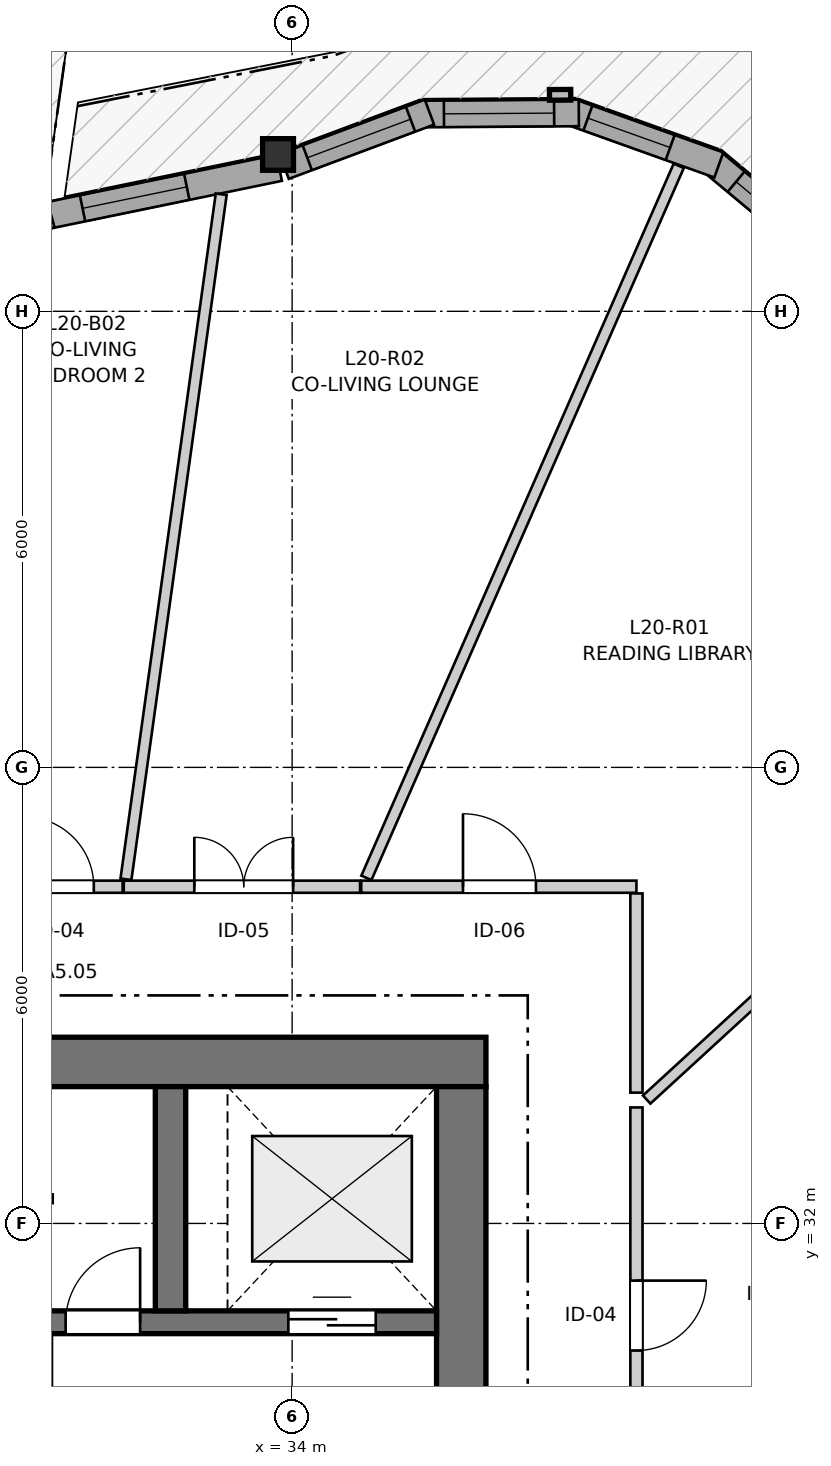
"""IFC4 building model, lengths in metres.
Left out: names, types, materials, properties, quantities, classifications, styles, units other than length and angle.
Written with IfcOpenShell. Run it as: python <this file> out.ifc"""

import sys

from ifc_helpers import new_model, si_unit, direction, frame, frame_2d, origin, origin_2d, place, context, subcontext, project, spatial, rectangle, i_section, extrude, source, transform, mapped, element, fill, save


model = new_model("IFC4")
c1 = context("Model", 3, precision=1e-05, world=origin(), true_north=direction((0.0, 1.0)))
c2 = subcontext(c1, "Body", "Model", "MODEL_VIEW")
j1 = project(units=[si_unit("LENGTHUNIT", "METRE"), si_unit("PLANEANGLEUNIT", "RADIAN")], contexts=[c1])
p1 = place(None, origin())
s1 = spatial("IfcSite", under=j1, at=p1, CompositionType="ELEMENT")
p2 = place(p1, origin())
s2 = spatial("IfcBuilding", under=s1, at=p2, CompositionType="ELEMENT")
p3 = place(p2, frame((0.0, 0.0, 70.4)))
s3 = spatial("IfcBuildingStorey", under=s2, at=p3, CompositionType="ELEMENT", Elevation=70.4)
p4 = place(p3, frame((36.55, 34.125, 0.0), z_axis=(0.0, 0.0, 1.0), x_axis=(-1.0, 0.0, 0.0)))
e1 = element("IfcWall", 1, at=p4, inside=s3, PredefinedType="SHEAR", context=c2, shape_type="SweptSolid", body=[
    extrude(rectangle(XDim=12.4, YDim=0.65, at=frame_2d((6.2, 0.0))), origin(), (0.0, 0.0, 1.0), 2.95),
])
p5 = place(p3, frame((36.225, 18.2, 0.0), z_axis=(0.0, 0.0, 1.0), x_axis=(0.0, 1.0, 0.0)))
e2 = element("IfcWall", 2, at=p5, inside=s3, PredefinedType="SHEAR", context=c2, shape_type="SweptSolid", body=[
    extrude(rectangle(XDim=15.6, YDim=0.65, at=frame_2d((7.8, 0.0))), origin(), (0.0, 0.0, 1.0), 2.95),
])
p6 = place(p5, frame((4.25, 0.0, 0.0)))
e3 = element("IfcOpeningElement", 3, at=p6, cuts=e2, PredefinedType="OPENING", context=c2, shape_type="SweptSolid", body=[
    extrude(rectangle(XDim=1.1, YDim=2.15, at=frame_2d((0.55, 1.075))), frame((0.0, 0.335, 0.0), z_axis=(0.0, -1.0, 0.0), x_axis=(1.0, 0.0, 0.0)), (0.0, 0.0, 1.0), 0.67),
])
p7 = place(p5, frame((10.25, 0.0, 0.0)))
e4 = element("IfcOpeningElement", 4, at=p7, cuts=e2, PredefinedType="OPENING", context=c2, shape_type="SweptSolid", body=[
    extrude(rectangle(XDim=1.1, YDim=2.15, at=frame_2d((0.55, 1.075))), frame((0.0, 0.335, 0.0), z_axis=(0.0, -1.0, 0.0), x_axis=(1.0, 0.0, 0.0)), (0.0, 0.0, 1.0), 0.67),
])
p8 = place(p3, frame((24.8, 30.7, 0.0), z_axis=(0.0, 0.0, 1.0), x_axis=(1.0, 0.0, 0.0)))
e5 = element("IfcWall", 5, at=p8, inside=s3, PredefinedType="SHEAR", context=c2, shape_type="SweptSolid", body=[
    extrude(rectangle(XDim=11.1, YDim=0.3, at=frame_2d((5.55, 0.0))), origin(), (0.0, 0.0, 1.0), 2.95),
])
p9 = place(p8, frame((6.22, 0.0, 0.0)))
e6 = element("IfcOpeningElement", 6, at=p9, cuts=e5, PredefinedType="OPENING", context=c2, shape_type="SweptSolid", body=[
    extrude(rectangle(XDim=0.98, YDim=2.15, at=frame_2d((0.49, 1.075))), frame((0.0, 0.16, 0.0), z_axis=(0.0, -1.0, 0.0), x_axis=(1.0, 0.0, 0.0)), (0.0, 0.0, 1.0), 0.32),
])
p10 = place(p8, frame((9.15, 0.0, 0.0)))
e7 = element("IfcOpeningElement", 7, at=p10, cuts=e5, PredefinedType="OPENING", context=c2, shape_type="SweptSolid", body=[
    extrude(rectangle(XDim=1.15, YDim=2.15, at=frame_2d((0.575, 1.075))), frame((0.0, 0.16, 0.0), z_axis=(0.0, -1.0, 0.0), x_axis=(1.0, 0.0, 0.0)), (0.0, 0.0, 1.0), 0.32),
])
p11 = place(p3, frame((32.4, 30.85, 0.0), z_axis=(0.0, 0.0, 1.0), x_axis=(0.0, 1.0, 0.0)))
e8 = element("IfcWall", 8, at=p11, inside=s3, PredefinedType="SHEAR", context=c2, shape_type="SweptSolid", body=[
    extrude(rectangle(XDim=2.95, YDim=0.4, at=frame_2d((1.475, 0.0))), origin(), (0.0, 0.0, 1.0), 2.95),
])
m1 = source(origin(), c2, "Body", "SweptSolid", [
    extrude(i_section(OverallWidth=0.406, OverallDepth=0.416, WebThickness=0.027, FlangeThickness=0.044, FilletRadius=0.015, at=origin_2d()), origin(), (0.0, 0.0, 1.0), 2.95),
])
p12 = place(p3, frame((33.815, 46.063, 0.0), z_axis=(0.0, 0.0, 1.0), x_axis=(1.0, 0.0, 0.0)))
e9 = element("IfcColumn", 9, at=p12, inside=s3, PredefinedType="PILASTER", context=c2, shape_type="MappedRepresentation", body=[
    mapped(m1, transform((0.0, 0.0, 0.0), x_axis=(1.0, 0.0, 0.0), y_axis=(0.0, 1.0, 0.0), z_axis=(0.0, 0.0, 1.0), scale=1.0)),
])
p13 = place(p3, frame((41.109, 44.65, 0.0), z_axis=(0.0, 0.0, 1.0), x_axis=(-0.768450068703, 0.639909752942, 0.0)))
e10 = element("IfcWall", 10, at=p13, inside=s3, PredefinedType="SOLIDWALL", context=c2, shape_type="SweptSolid", body=[
    extrude(rectangle(XDim=2.099, YDim=0.35, at=frame_2d((1.049, 0.0))), origin(), (0.0, 0.0, 1.0), 2.48),
])
p14 = place(p13, frame((0.449, 0.0, 0.82)))
e11 = element("IfcOpeningElement", 11, at=p14, cuts=e10, PredefinedType="OPENING", context=c2, shape_type="SweptSolid", body=[
    extrude(rectangle(XDim=1.2, YDim=1.45, at=frame_2d((0.6, 0.725))), frame((0.0, 0.185, 0.0), z_axis=(0.0, -1.0, 0.0), x_axis=(1.0, 0.0, 0.0)), (0.0, 0.0, 1.0), 0.37),
])
p15 = place(p3, frame((39.614, 45.925, 0.0), z_axis=(0.0, 0.0, 1.0), x_axis=(-0.941486401639, 0.33705096874, 0.0)))
e12 = element("IfcWall", 12, at=p15, inside=s3, PredefinedType="SOLIDWALL", context=c2, shape_type="SweptSolid", body=[
    extrude(rectangle(XDim=2.099, YDim=0.35, at=frame_2d((1.05, 0.0))), origin(), (0.0, 0.0, 1.0), 2.48),
])
p16 = place(p15, frame((0.68, 0.0, 0.82)))
e13 = element("IfcOpeningElement", 13, at=p16, cuts=e12, PredefinedType="OPENING", context=c2, shape_type="SweptSolid", body=[
    extrude(rectangle(XDim=1.15, YDim=1.2, at=frame_2d((0.575, 0.6))), frame((0.0, 0.185, 0.0), z_axis=(0.0, -1.0, 0.0), x_axis=(1.0, 0.0, 0.0)), (0.0, 0.0, 1.0), 0.37),
])
p17 = place(p3, frame((37.772, 46.61, 0.0), z_axis=(0.0, 0.0, 1.0), x_axis=(-0.999976451414, -0.006862697526, 0.0)))
e14 = element("IfcWall", 14, at=p17, inside=s3, PredefinedType="SOLIDWALL", context=c2, shape_type="SweptSolid", body=[
    extrude(rectangle(XDim=2.099, YDim=0.35, at=frame_2d((1.049, 0.0))), origin(), (0.0, 0.0, 1.0), 2.48),
])
p18 = place(p17, frame((0.324, 0.0, 0.82)))
e15 = element("IfcOpeningElement", 15, at=p18, cuts=e14, PredefinedType="OPENING", context=c2, shape_type="SweptSolid", body=[
    extrude(rectangle(XDim=1.45, YDim=1.25, at=frame_2d((0.725, 0.625))), frame((0.0, 0.185, 0.0), z_axis=(0.0, -1.0, 0.0), x_axis=(1.0, 0.0, 0.0)), (0.0, 0.0, 1.0), 0.37),
])
p19 = place(p3, frame((35.806, 46.62, 0.0), z_axis=(0.0, 0.0, 1.0), x_axis=(-0.936863987578, -0.34969396446, 0.0)))
e16 = element("IfcWall", 16, at=p19, inside=s3, PredefinedType="SOLIDWALL", context=c2, shape_type="SweptSolid", body=[
    extrude(rectangle(XDim=2.041, YDim=0.35, at=frame_2d((1.021, 0.0))), origin(), (0.0, 0.0, 1.0), 2.48),
])
p20 = place(p19, frame((0.265, 0.0, 0.82)))
e17 = element("IfcOpeningElement", 17, at=p20, cuts=e16, PredefinedType="OPENING", context=c2, shape_type="SweptSolid", body=[
    extrude(rectangle(XDim=1.45, YDim=1.25, at=frame_2d((0.725, 0.625))), frame((0.0, 0.185, 0.0), z_axis=(0.0, -1.0, 0.0), x_axis=(1.0, 0.0, 0.0)), (0.0, 0.0, 1.0), 0.37),
])
p21 = place(p3, frame((33.83, 45.888, 0.0), z_axis=(0.0, 0.0, 1.0), x_axis=(-0.979439051097, -0.201740291429, 0.0)))
e18 = element("IfcWall", 18, at=p21, inside=s3, PredefinedType="SOLIDWALL", context=c2, shape_type="SweptSolid", body=[
    extrude(rectangle(XDim=3.154, YDim=0.35, at=frame_2d((1.577, 0.0))), origin(), (0.0, 0.0, 1.0), 2.48),
])
p22 = place(p21, frame((1.242, 0.0, 0.82)))
e19 = element("IfcOpeningElement", 19, at=p22, cuts=e18, PredefinedType="OPENING", context=c2, shape_type="SweptSolid", body=[
    extrude(rectangle(XDim=1.4, YDim=1.35, at=frame_2d((0.7, 0.675))), frame((0.0, 0.185, 0.0), z_axis=(0.0, -1.0, 0.0), x_axis=(1.0, 0.0, 0.0)), (0.0, 0.0, 1.0), 0.37),
])
p23 = place(p3, frame((30.827, 45.272, 0.0), z_axis=(0.0, 0.0, 1.0), x_axis=(-0.963061576901, -0.269281263918, 0.0)))
e20 = element("IfcWall", 20, at=p23, inside=s3, PredefinedType="SOLIDWALL", context=c2, shape_type="SweptSolid", body=[
    extrude(rectangle(XDim=2.883, YDim=0.35, at=frame_2d((1.441, 0.0))), origin(), (0.0, 0.0, 1.0), 2.48),
])
p24 = place(p23, frame((1.163, 0.0, 0.82)))
e21 = element("IfcOpeningElement", 21, at=p24, cuts=e20, PredefinedType="OPENING", context=c2, shape_type="SweptSolid", body=[
    extrude(rectangle(XDim=1.25, YDim=1.35, at=frame_2d((0.625, 0.675))), frame((0.0, 0.185, 0.0), z_axis=(0.0, -1.0, 0.0), x_axis=(1.0, 0.0, 0.0)), (0.0, 0.0, 1.0), 0.37),
])
p25 = place(p3, frame((38.53, 33.526, 0.0), z_axis=(0.0, 0.0, 1.0), x_axis=(0.0, -1.0, 0.0)))
e22 = element("IfcWall", 22, at=p25, inside=s3, PredefinedType="PARTITIONING", context=c2, shape_type="SweptSolid", body=[
    extrude(rectangle(XDim=5.472, YDim=0.16, at=frame_2d((2.736, 0.0))), origin(), (0.0, 0.0, 1.0), 2.95),
])
p26 = place(p25, frame((2.278, 0.0, 0.0)))
e23 = element("IfcOpeningElement", 23, at=p26, cuts=e22, PredefinedType="OPENING", context=c2, shape_type="SweptSolid", body=[
    extrude(rectangle(XDim=0.92, YDim=2.1, at=frame_2d((0.46, 1.05))), frame((0.0, 0.09, 0.0), z_axis=(0.0, -1.0, 0.0), x_axis=(1.0, 0.0, 0.0)), (0.0, 0.0, 1.0), 0.18),
])
p27 = place(p3, frame((34.909, 36.43, 0.0), z_axis=(0.0, 0.0, 1.0), x_axis=(1.0, 0.0, 0.0)))
e24 = element("IfcWall", 24, at=p27, inside=s3, PredefinedType="PARTITIONING", context=c2, shape_type="SweptSolid", body=[
    extrude(rectangle(XDim=3.621, YDim=0.16, at=frame_2d((1.811, 0.0))), origin(), (0.0, 0.0, 1.0), 2.588),
])
p28 = place(p27, frame((1.339, 0.0, 0.0)))
e25 = element("IfcOpeningElement", 25, at=p28, cuts=e24, PredefinedType="OPENING", context=c2, shape_type="SweptSolid", body=[
    extrude(rectangle(XDim=0.96, YDim=2.1, at=frame_2d((0.48, 1.05))), frame((0.0, 0.09, 0.0), z_axis=(0.0, -1.0, 0.0), x_axis=(1.0, 0.0, 0.0)), (0.0, 0.0, 1.0), 0.18),
])
p29 = place(p3, frame((31.785, 36.43, 0.0), z_axis=(0.0, 0.0, 1.0), x_axis=(1.0, 0.0, 0.0)))
e26 = element("IfcWall", 26, at=p29, inside=s3, PredefinedType="PARTITIONING", context=c2, shape_type="SweptSolid", body=[
    extrude(rectangle(XDim=3.109, YDim=0.16, at=frame_2d((1.555, 0.0))), origin(), (0.0, 0.0, 1.0), 2.95),
])
p30 = place(p29, frame((0.928, 0.0, 0.0)))
e27 = element("IfcOpeningElement", 27, at=p30, cuts=e26, PredefinedType="OPENING", context=c2, shape_type="SweptSolid", body=[
    extrude(rectangle(XDim=1.3, YDim=2.1, at=frame_2d((0.65, 1.05))), frame((0.0, 0.09, 0.0), z_axis=(0.0, -1.0, 0.0), x_axis=(1.0, 0.0, 0.0)), (0.0, 0.0, 1.0), 0.18),
])
p31 = place(p3, frame((30.091, 36.43, 0.0), z_axis=(0.0, 0.0, 1.0), x_axis=(1.0, 0.0, 0.0)))
e28 = element("IfcWall", 28, at=p31, inside=s3, PredefinedType="PARTITIONING", context=c2, shape_type="SweptSolid", body=[
    extrude(rectangle(XDim=1.679, YDim=0.16, at=frame_2d((0.839, 0.0))), origin(), (0.0, 0.0, 1.0), 2.95),
])
p32 = place(p31, frame((0.379, 0.0, 0.0)))
e29 = element("IfcOpeningElement", 29, at=p32, cuts=e28, PredefinedType="OPENING", context=c2, shape_type="SweptSolid", body=[
    extrude(rectangle(XDim=0.92, YDim=2.1, at=frame_2d((0.46, 1.05))), frame((0.0, 0.09, 0.0), z_axis=(0.0, -1.0, 0.0), x_axis=(1.0, 0.0, 0.0)), (0.0, 0.0, 1.0), 0.18),
])
p33 = place(p3, frame((34.977, 36.546, 0.0), z_axis=(0.0, 0.0, 1.0), x_axis=(0.40175384449, 0.915747699117, 0.0)))
e30 = element("IfcWall", 30, at=p33, inside=s3, PredefinedType="PARTITIONING", context=c2, shape_type="SweptSolid", body=[
    extrude(rectangle(XDim=10.23, YDim=0.145, at=frame_2d((5.115, 0.0))), origin(), (0.0, 0.0, 1.0), 2.95),
])
p34 = place(p3, frame((31.814, 36.528, 0.0), z_axis=(0.0, 0.0, 1.0), x_axis=(0.137724115974, 0.990470629488, 0.0)))
e31 = element("IfcWall", 31, at=p34, inside=s3, PredefinedType="PARTITIONING", context=c2, shape_type="SweptSolid", body=[
    extrude(rectangle(XDim=9.099, YDim=0.145, at=frame_2d((4.55, 0.0))), origin(), (0.0, 0.0, 1.0), 2.95),
])
p35 = place(p3, frame((38.665, 33.63, 0.0), z_axis=(0.0, 0.0, 1.0), x_axis=(0.736824900837, 0.676083623161, 0.0)))
e32 = element("IfcWall", 32, at=p35, inside=s3, PredefinedType="PARTITIONING", context=c2, shape_type="SweptSolid", body=[
    extrude(rectangle(XDim=6.25, YDim=0.145, at=frame_2d((3.125, 0.0))), origin(), (0.0, 0.0, 1.0), 2.95),
])
p36 = place(p3, frame((38.53, 33.721, 0.0), z_axis=(0.0, 0.0, 1.0), x_axis=(0.0, 1.0, 0.0)))
e33 = element("IfcWall", 33, at=p36, inside=s3, PredefinedType="PARTITIONING", context=c2, shape_type="SweptSolid", body=[
    extrude(rectangle(XDim=2.621, YDim=0.16, at=frame_2d((1.311, 0.0))), origin(), (0.0, 0.0, 1.0), 2.588),
])
m2 = source(origin(), c2, "Body", "SweptSolid", [
    extrude(rectangle(XDim=1.2, YDim=1.45, at=frame_2d((0.6, 0.725))), frame((0.0, 0.03, 0.0), z_axis=(0.0, -1.0, 0.0), x_axis=(1.0, 0.0, 0.0)), (0.0, 0.0, 1.0), 0.06),
])
p37 = place(p14, origin())
e34 = element("IfcWindow", 34, at=p37, inside=s3, PartitioningType="SINGLE_PANEL", PredefinedType="WINDOW", context=c2, shape_type="MappedRepresentation", body=[
    mapped(m2, transform((0.0, 0.0, 0.0), x_axis=(1.0, 0.0, 0.0), y_axis=(0.0, 1.0, 0.0), z_axis=(0.0, 0.0, 1.0), scale=1.0)),
])
fill(e11, e34)
m3 = source(origin(), c2, "Body", "SweptSolid", [
    extrude(rectangle(XDim=1.15, YDim=1.2, at=frame_2d((0.575, 0.6))), frame((0.0, 0.03, 0.0), z_axis=(0.0, -1.0, 0.0), x_axis=(1.0, 0.0, 0.0)), (0.0, 0.0, 1.0), 0.06),
])
p38 = place(p16, origin())
e35 = element("IfcWindow", 35, at=p38, inside=s3, PartitioningType="SINGLE_PANEL", PredefinedType="WINDOW", context=c2, shape_type="MappedRepresentation", body=[
    mapped(m3, transform((0.0, 0.0, 0.0), x_axis=(1.0, 0.0, 0.0), y_axis=(0.0, 1.0, 0.0), z_axis=(0.0, 0.0, 1.0), scale=1.0)),
])
fill(e13, e35)
m4 = source(origin(), c2, "Body", "SweptSolid", [
    extrude(rectangle(XDim=1.45, YDim=1.25, at=frame_2d((0.725, 0.625))), frame((0.0, 0.03, 0.0), z_axis=(0.0, -1.0, 0.0), x_axis=(1.0, 0.0, 0.0)), (0.0, 0.0, 1.0), 0.06),
])
p39 = place(p18, origin())
e36 = element("IfcWindow", 36, at=p39, inside=s3, PartitioningType="SINGLE_PANEL", PredefinedType="WINDOW", context=c2, shape_type="MappedRepresentation", body=[
    mapped(m4, transform((0.0, 0.0, 0.0), x_axis=(1.0, 0.0, 0.0), y_axis=(0.0, 1.0, 0.0), z_axis=(0.0, 0.0, 1.0), scale=1.0)),
])
fill(e15, e36)
p40 = place(p20, origin())
e37 = element("IfcWindow", 37, at=p40, inside=s3, PartitioningType="SINGLE_PANEL", PredefinedType="WINDOW", context=c2, shape_type="MappedRepresentation", body=[
    mapped(m4, transform((0.0, 0.0, 0.0), x_axis=(1.0, 0.0, 0.0), y_axis=(0.0, 1.0, 0.0), z_axis=(0.0, 0.0, 1.0), scale=1.0)),
])
fill(e17, e37)
m5 = source(origin(), c2, "Body", "SweptSolid", [
    extrude(rectangle(XDim=1.4, YDim=1.35, at=frame_2d((0.7, 0.675))), frame((0.0, 0.03, 0.0), z_axis=(0.0, -1.0, 0.0), x_axis=(1.0, 0.0, 0.0)), (0.0, 0.0, 1.0), 0.06),
])
p41 = place(p22, origin())
e38 = element("IfcWindow", 38, at=p41, inside=s3, PartitioningType="SINGLE_PANEL", PredefinedType="WINDOW", context=c2, shape_type="MappedRepresentation", body=[
    mapped(m5, transform((0.0, 0.0, 0.0), x_axis=(1.0, 0.0, 0.0), y_axis=(0.0, 1.0, 0.0), z_axis=(0.0, 0.0, 1.0), scale=1.0)),
])
fill(e19, e38)
m6 = source(origin(), c2, "Body", "SweptSolid", [
    extrude(rectangle(XDim=0.98, YDim=2.15, at=frame_2d((0.49, 1.075))), frame((0.0, 0.025, 0.0), z_axis=(0.0, -1.0, 0.0), x_axis=(1.0, 0.0, 0.0)), (0.0, 0.0, 1.0), 0.05),
])
p42 = place(p9, origin())
e39 = element("IfcDoor", 39, at=p42, inside=s3, OperationType="SINGLE_SWING_RIGHT", PredefinedType="DOOR", context=c2, shape_type="MappedRepresentation", body=[
    mapped(m6, transform((0.0, 0.0, 0.0), x_axis=(1.0, 0.0, 0.0), y_axis=(0.0, 1.0, 0.0), z_axis=(0.0, 0.0, 1.0), scale=1.0)),
])
fill(e6, e39)
m7 = source(origin(), c2, "Body", "SweptSolid", [
    extrude(rectangle(XDim=1.15, YDim=2.15, at=frame_2d((0.575, 1.075))), frame((0.0, 0.025, 0.0), z_axis=(0.0, -1.0, 0.0), x_axis=(1.0, 0.0, 0.0)), (0.0, 0.0, 1.0), 0.05),
])
p43 = place(p10, origin())
e40 = element("IfcDoor", 40, at=p43, inside=s3, OperationType="DOUBLE_DOOR_SLIDING", PredefinedType="DOOR", context=c2, shape_type="MappedRepresentation", body=[
    mapped(m7, transform((0.0, 0.0, 0.0), x_axis=(1.0, 0.0, 0.0), y_axis=(0.0, 1.0, 0.0), z_axis=(0.0, 0.0, 1.0), scale=1.0)),
])
fill(e7, e40)
m8 = source(origin(), c2, "Body", "SweptSolid", [
    extrude(rectangle(XDim=0.92, YDim=2.1, at=frame_2d((0.46, 1.05))), frame((0.0, 0.025, 0.0), z_axis=(0.0, -1.0, 0.0), x_axis=(1.0, 0.0, 0.0)), (0.0, 0.0, 1.0), 0.05),
])
p44 = place(p26, origin())
e41 = element("IfcDoor", 41, at=p44, inside=s3, OperationType="SINGLE_SWING_LEFT", PredefinedType="DOOR", context=c2, shape_type="MappedRepresentation", body=[
    mapped(m8, transform((0.0, 0.0, 0.0), x_axis=(1.0, 0.0, 0.0), y_axis=(0.0, 1.0, 0.0), z_axis=(0.0, 0.0, 1.0), scale=1.0)),
])
fill(e23, e41)
m9 = source(origin(), c2, "Body", "SweptSolid", [
    extrude(rectangle(XDim=0.96, YDim=2.1, at=frame_2d((0.48, 1.05))), frame((0.0, 0.025, 0.0), z_axis=(0.0, -1.0, 0.0), x_axis=(1.0, 0.0, 0.0)), (0.0, 0.0, 1.0), 0.05),
])
p45 = place(p28, origin())
e42 = element("IfcDoor", 42, at=p45, inside=s3, OperationType="SINGLE_SWING_LEFT", PredefinedType="DOOR", context=c2, shape_type="MappedRepresentation", body=[
    mapped(m9, transform((0.0, 0.0, 0.0), x_axis=(1.0, 0.0, 0.0), y_axis=(0.0, 1.0, 0.0), z_axis=(0.0, 0.0, 1.0), scale=1.0)),
])
fill(e25, e42)
m10 = source(origin(), c2, "Body", "SweptSolid", [
    extrude(rectangle(XDim=1.3, YDim=2.1, at=frame_2d((0.65, 1.05))), frame((0.0, 0.025, 0.0), z_axis=(0.0, -1.0, 0.0), x_axis=(1.0, 0.0, 0.0)), (0.0, 0.0, 1.0), 0.05),
])
p46 = place(p30, origin())
e43 = element("IfcDoor", 43, at=p46, inside=s3, OperationType="DOUBLE_DOOR_SINGLE_SWING", PredefinedType="DOOR", context=c2, shape_type="MappedRepresentation", body=[
    mapped(m10, transform((0.0, 0.0, 0.0), x_axis=(1.0, 0.0, 0.0), y_axis=(0.0, 1.0, 0.0), z_axis=(0.0, 0.0, 1.0), scale=1.0)),
])
fill(e27, e43)
p47 = place(p32, origin())
e44 = element("IfcDoor", 44, at=p47, inside=s3, OperationType="SINGLE_SWING_LEFT", PredefinedType="DOOR", context=c2, shape_type="MappedRepresentation", body=[
    mapped(m8, transform((0.0, 0.0, 0.0), x_axis=(1.0, 0.0, 0.0), y_axis=(0.0, 1.0, 0.0), z_axis=(0.0, 0.0, 1.0), scale=1.0)),
])
fill(e29, e44)
save(model, sys.argv[1])
